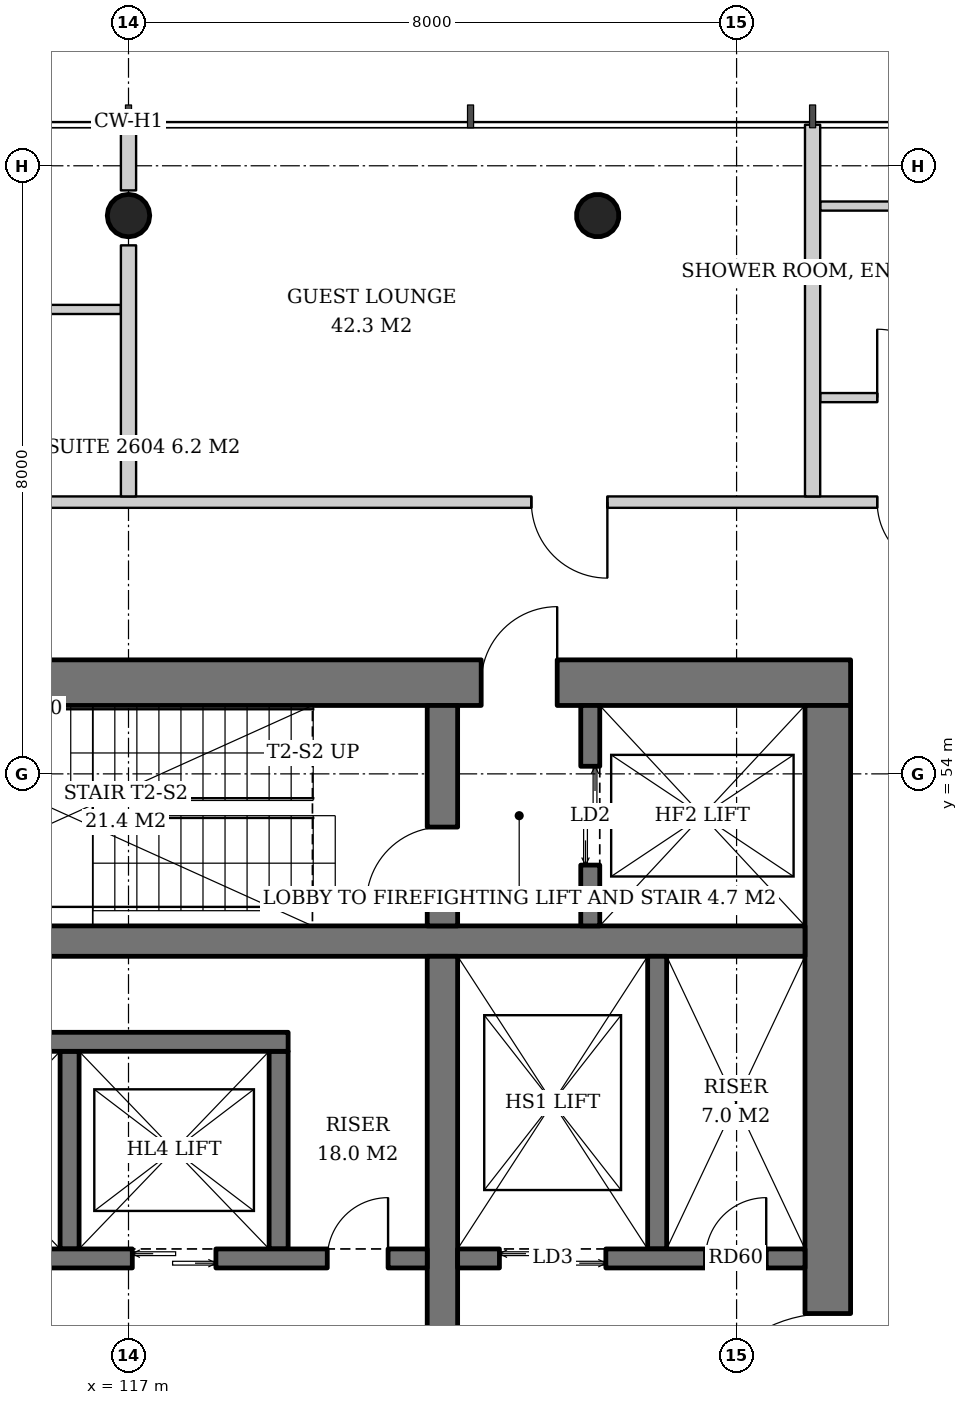
"""IFC4 building model, lengths in metres.
Left out: names, types, materials, properties, quantities, classifications, styles, units other than length and angle.
Written with IfcOpenShell. Run it as: python <this file> out.ifc"""

import sys

from ifc_helpers import new_model, si_unit, direction, frame, frame_2d, origin, origin_2d, place, context, subcontext, project, spatial, rectangle, hollow_circle, extrude, element, fill, save


model = new_model("IFC4")
c1 = context("Model", 3, precision=1e-05, world=origin(), true_north=direction((0.0, 1.0)))
c2 = subcontext(c1, "Body", "Model", "MODEL_VIEW")
j1 = project(units=[si_unit("LENGTHUNIT", "METRE"), si_unit("PLANEANGLEUNIT", "RADIAN")], contexts=[c1])
p1 = place(None, origin())
s1 = spatial("IfcSite", under=j1, at=p1, CompositionType="ELEMENT")
p2 = place(p1, origin())
s2 = spatial("IfcBuilding", under=s1, at=p2, CompositionType="ELEMENT")
p3 = place(p2, frame((0.0, 0.0, 104.6)))
s3 = spatial("IfcBuildingStorey", under=s2, at=p3, CompositionType="ELEMENT", Elevation=104.6)
p4 = place(p3, frame((123.198, 61.396, 0.0), z_axis=(-0.02149908433, -0.04306234503, 0.998841040313), x_axis=(0.894693706707, -0.446680166538, 0.0)))
e1 = element("IfcColumn", 1, at=p4, inside=s3, PredefinedType="COLUMN", context=c2, shape_type="SweptSolid", body=[
    extrude(hollow_circle(Radius=0.28, WallThickness=0.02, at=origin_2d()), origin(), (0.0, 0.0, 1.0), 3.804),
])
p5 = place(p3, frame((117.0, 61.396, 0.0), z_axis=(0.0, -0.043072300418, 0.999071957837), x_axis=(1.0, 0.0, 0.0)))
e2 = element("IfcColumn", 2, at=p5, inside=s3, PredefinedType="COLUMN", context=c2, shape_type="SweptSolid", body=[
    extrude(hollow_circle(Radius=0.28, WallThickness=0.02, at=origin_2d()), origin(), (0.0, 0.0, 1.0), 3.803),
])
p6 = place(p3, frame((107.5, 55.2, 0.0), z_axis=(0.0, 0.0, 1.0), x_axis=(1.0, 0.0, 0.0)))
e3 = element("IfcWall", 3, at=p6, inside=s3, PredefinedType="SHEAR", context=c2, shape_type="SweptSolid", body=[
    extrude(rectangle(XDim=19.0, YDim=0.6, at=frame_2d((9.5, 0.0))), origin(), (0.0, 0.0, 1.0), 3.8),
])
p7 = place(p6, frame((14.14, 0.0, 0.0)))
e4 = element("IfcOpeningElement", 4, at=p7, cuts=e3, PredefinedType="OPENING", context=c2, shape_type="SweptSolid", body=[
    extrude(rectangle(XDim=1.0, YDim=2.1, at=frame_2d((0.5, 1.05))), frame((0.0, 0.31, 0.0), z_axis=(0.0, -1.0, 0.0), x_axis=(1.0, 0.0, 0.0)), (0.0, 0.0, 1.0), 0.62),
])
p8 = place(p6, frame((2.425, 0.0, 0.0)))
e5 = element("IfcOpeningElement", 5, at=p8, cuts=e3, PredefinedType="OPENING", context=c2, shape_type="SweptSolid", body=[
    extrude(rectangle(XDim=1.0, YDim=2.1, at=frame_2d((0.5, 1.05))), frame((0.0, 0.31, 0.0), z_axis=(0.0, -1.0, 0.0), x_axis=(1.0, 0.0, 0.0)), (0.0, 0.0, 1.0), 0.62),
])
p9 = place(p3, frame((126.2, 37.1, 0.0), z_axis=(0.0, 0.0, 1.0), x_axis=(0.0, 1.0, 0.0)))
e6 = element("IfcWall", 6, at=p9, inside=s3, PredefinedType="SHEAR", context=c2, shape_type="SweptSolid", body=[
    extrude(rectangle(XDim=17.8, YDim=0.6, at=frame_2d((8.9, 0.0))), origin(), (0.0, 0.0, 1.0), 3.8),
])
p10 = place(p9, frame((8.0, 0.0, 0.0)))
e7 = element("IfcOpeningElement", 7, at=p10, cuts=e6, PredefinedType="OPENING", context=c2, shape_type="SweptSolid", body=[
    extrude(rectangle(XDim=1.8, YDim=2.4, at=frame_2d((0.9, 1.2))), frame((0.0, 0.31, 0.0), z_axis=(0.0, -1.0, 0.0), x_axis=(1.0, 0.0, 0.0)), (0.0, 0.0, 1.0), 0.62),
])
p11 = place(p3, frame((108.1, 51.8, 0.0), z_axis=(0.0, 0.0, 1.0), x_axis=(1.0, 0.0, 0.0)))
e8 = element("IfcWall", 8, at=p11, inside=s3, PredefinedType="SHEAR", context=c2, shape_type="SweptSolid", body=[
    extrude(rectangle(XDim=17.8, YDim=0.4, at=frame_2d((8.9, 0.0))), origin(), (0.0, 0.0, 1.0), 3.8),
])
p12 = place(p3, frame((121.13, 40.4, 0.0), z_axis=(0.0, 0.0, 1.0), x_axis=(0.0, 1.0, 0.0)))
e9 = element("IfcWall", 9, at=p12, inside=s3, PredefinedType="SHEAR", context=c2, shape_type="SweptSolid", body=[
    extrude(rectangle(XDim=11.2, YDim=0.4, at=frame_2d((5.6, 0.0))), origin(), (0.0, 0.0, 1.0), 3.8),
])
p13 = place(p3, frame((121.13, 52.0, 0.0), z_axis=(0.0, 0.0, 1.0), x_axis=(0.0, 1.0, 0.0)))
e10 = element("IfcWall", 10, at=p13, inside=s3, PredefinedType="SHEAR", context=c2, shape_type="SweptSolid", body=[
    extrude(rectangle(XDim=2.9, YDim=0.4, at=frame_2d((1.45, 0.0))), origin(), (0.0, 0.0, 1.0), 3.8),
])
p14 = place(p13, frame((0.3, 0.0, 0.0)))
e11 = element("IfcOpeningElement", 11, at=p14, cuts=e10, PredefinedType="OPENING", context=c2, shape_type="SweptSolid", body=[
    extrude(rectangle(XDim=1.0, YDim=2.1, at=frame_2d((0.5, 1.05))), frame((0.0, 0.21, 0.0), z_axis=(0.0, -1.0, 0.0), x_axis=(1.0, 0.0, 0.0)), (0.0, 0.0, 1.0), 0.42),
])
p15 = place(p3, frame((123.075, 52.0, 0.0), z_axis=(0.0, 0.0, 1.0), x_axis=(0.0, 1.0, 0.0)))
e12 = element("IfcWall", 12, at=p15, inside=s3, PredefinedType="SHEAR", context=c2, shape_type="SweptSolid", body=[
    extrude(rectangle(XDim=2.9, YDim=0.25, at=frame_2d((1.45, 0.0))), origin(), (0.0, 0.0, 1.0), 3.8),
])
p16 = place(p15, frame((0.8, 0.0, 0.0)))
e13 = element("IfcOpeningElement", 13, at=p16, cuts=e12, PredefinedType="OPENING", context=c2, shape_type="SweptSolid", body=[
    extrude(rectangle(XDim=1.3, YDim=2.2, at=frame_2d((0.65, 1.1))), frame((0.0, 0.135, 0.0), z_axis=(0.0, -1.0, 0.0), x_axis=(1.0, 0.0, 0.0)), (0.0, 0.0, 1.0), 0.27),
])
for number, where, z_axis, x_axis in (
    (14, (116.225, 47.75, 0.0), (0.0, 0.0, 1.0), (0.0, 1.0, 0.0)),
    (15, (118.975, 47.75, 0.0), (0.0, 0.0, 1.0), (0.0, 1.0, 0.0)),
):
    element("IfcWall", number, at=place(p3, frame(where, z_axis=z_axis, x_axis=x_axis)), inside=s3, PredefinedType="SHEAR", context=c2, shape_type="SweptSolid", body=[
        extrude(rectangle(XDim=2.6, YDim=0.25, at=frame_2d((1.3, 0.0))), origin(), (0.0, 0.0, 1.0), 3.8),
    ])
p17 = place(p3, frame((108.1, 50.475, 0.0), z_axis=(0.0, 0.0, 1.0), x_axis=(1.0, 0.0, 0.0)))
e16 = element("IfcWall", 16, at=p17, inside=s3, PredefinedType="SHEAR", context=c2, shape_type="SweptSolid", body=[
    extrude(rectangle(XDim=11.0, YDim=0.25, at=frame_2d((5.5, 0.0))), origin(), (0.0, 0.0, 1.0), 3.8),
])
p18 = place(p3, frame((108.1, 47.625, 0.0), z_axis=(0.0, 0.0, 1.0), x_axis=(1.0, 0.0, 0.0)))
e17 = element("IfcWall", 17, at=p18, inside=s3, PredefinedType="SHEAR", context=c2, shape_type="SweptSolid", body=[
    extrude(rectangle(XDim=12.83, YDim=0.25, at=frame_2d((6.415, 0.0))), origin(), (0.0, 0.0, 1.0), 3.8),
])
p19 = place(p18, frame((0.7, 0.0, 0.0)))
e18 = element("IfcOpeningElement", 18, at=p19, cuts=e17, PredefinedType="OPENING", context=c2, shape_type="SweptSolid", body=[
    extrude(rectangle(XDim=1.1, YDim=2.2, at=frame_2d((0.55, 1.1))), frame((0.0, 0.135, 0.0), z_axis=(0.0, -1.0, 0.0), x_axis=(1.0, 0.0, 0.0)), (0.0, 0.0, 1.0), 0.27),
])
p20 = place(p18, frame((3.45, 0.0, 0.0)))
e19 = element("IfcOpeningElement", 19, at=p20, cuts=e17, PredefinedType="OPENING", context=c2, shape_type="SweptSolid", body=[
    extrude(rectangle(XDim=1.1, YDim=2.2, at=frame_2d((0.55, 1.1))), frame((0.0, 0.135, 0.0), z_axis=(0.0, -1.0, 0.0), x_axis=(1.0, 0.0, 0.0)), (0.0, 0.0, 1.0), 0.27),
])
p21 = place(p18, frame((6.2, 0.0, 0.0)))
e20 = element("IfcOpeningElement", 20, at=p21, cuts=e17, PredefinedType="OPENING", context=c2, shape_type="SweptSolid", body=[
    extrude(rectangle(XDim=1.1, YDim=2.2, at=frame_2d((0.55, 1.1))), frame((0.0, 0.135, 0.0), z_axis=(0.0, -1.0, 0.0), x_axis=(1.0, 0.0, 0.0)), (0.0, 0.0, 1.0), 0.27),
])
p22 = place(p18, frame((8.95, 0.0, 0.0)))
e21 = element("IfcOpeningElement", 21, at=p22, cuts=e17, PredefinedType="OPENING", context=c2, shape_type="SweptSolid", body=[
    extrude(rectangle(XDim=1.1, YDim=2.2, at=frame_2d((0.55, 1.1))), frame((0.0, 0.135, 0.0), z_axis=(0.0, -1.0, 0.0), x_axis=(1.0, 0.0, 0.0)), (0.0, 0.0, 1.0), 0.27),
])
p23 = place(p18, frame((11.515, 0.0, 0.0)))
e22 = element("IfcOpeningElement", 22, at=p23, cuts=e17, PredefinedType="OPENING", context=c2, shape_type="SweptSolid", body=[
    extrude(rectangle(XDim=0.8, YDim=2.0, at=frame_2d((0.4, 1.0))), frame((0.0, 0.135, 0.0), z_axis=(0.0, -1.0, 0.0), x_axis=(1.0, 0.0, 0.0)), (0.0, 0.0, 1.0), 0.27),
])
p24 = place(p3, frame((123.955, 47.75, 0.0), z_axis=(0.0, 0.0, 1.0), x_axis=(0.0, 1.0, 0.0)))
e23 = element("IfcWall", 23, at=p24, inside=s3, PredefinedType="SHEAR", context=c2, shape_type="SweptSolid", body=[
    extrude(rectangle(XDim=3.85, YDim=0.25, at=frame_2d((1.925, 0.0))), origin(), (0.0, 0.0, 1.0), 3.8),
])
p25 = place(p3, frame((121.33, 47.625, 0.0), z_axis=(0.0, 0.0, 1.0), x_axis=(1.0, 0.0, 0.0)))
e24 = element("IfcWall", 24, at=p25, inside=s3, PredefinedType="SHEAR", context=c2, shape_type="SweptSolid", body=[
    extrude(rectangle(XDim=4.57, YDim=0.25, at=frame_2d((2.285, 0.0))), origin(), (0.0, 0.0, 1.0), 3.8),
])
p26 = place(p25, frame((0.55, 0.0, 0.0)))
e25 = element("IfcOpeningElement", 25, at=p26, cuts=e24, PredefinedType="OPENING", context=c2, shape_type="SweptSolid", body=[
    extrude(rectangle(XDim=1.4, YDim=2.4, at=frame_2d((0.7, 1.2))), frame((0.0, 0.135, 0.0), z_axis=(0.0, -1.0, 0.0), x_axis=(1.0, 0.0, 0.0)), (0.0, 0.0, 1.0), 0.27),
])
p27 = place(p25, frame((3.26, 0.0, 0.0)))
e26 = element("IfcOpeningElement", 26, at=p27, cuts=e24, PredefinedType="OPENING", context=c2, shape_type="SweptSolid", body=[
    extrude(rectangle(XDim=0.8, YDim=2.0, at=frame_2d((0.4, 1.0))), frame((0.0, 0.135, 0.0), z_axis=(0.0, -1.0, 0.0), x_axis=(1.0, 0.0, 0.0)), (0.0, 0.0, 1.0), 0.27),
])
p28 = place(p3, frame((126.1, 58.95, 0.0), z_axis=(0.0, 0.0, 1.0), x_axis=(1.0, 0.0, 0.0)))
e27 = element("IfcWall", 27, at=p28, inside=s3, PredefinedType="PARTITIONING", context=c2, shape_type="SweptSolid", body=[
    extrude(rectangle(XDim=2.58, YDim=0.12, at=frame_2d((1.29, 0.0))), origin(), (0.0, 0.0, 1.0), 2.9),
])
p29 = place(p28, frame((0.75, 0.0, 0.0)))
e28 = element("IfcOpeningElement", 28, at=p29, cuts=e27, PredefinedType="OPENING", context=c2, shape_type="SweptSolid", body=[
    extrude(rectangle(XDim=0.9, YDim=2.1, at=frame_2d((0.45, 1.05))), frame((0.0, 0.07, 0.0), z_axis=(0.0, -1.0, 0.0), x_axis=(1.0, 0.0, 0.0)), (0.0, 0.0, 1.0), 0.14),
])
p30 = place(p3, frame((126.1, 61.47, 0.0), z_axis=(0.0, 0.0, 1.0), x_axis=(1.0, 0.0, 0.0)))
e29 = element("IfcWall", 29, at=p30, inside=s3, PredefinedType="PARTITIONING", context=c2, shape_type="SweptSolid", body=[
    extrude(rectangle(XDim=2.81, YDim=0.12, at=frame_2d((1.405, 0.0))), origin(), (0.0, 0.0, 1.0), 3.6),
])
p31 = place(p3, frame((116.9, 60.11, 0.0), z_axis=(0.0, 0.0, 1.0), x_axis=(-1.0, 0.0, 0.0)))
e30 = element("IfcWall", 30, at=p31, inside=s3, PredefinedType="PARTITIONING", context=c2, shape_type="SweptSolid", body=[
    extrude(rectangle(XDim=2.42, YDim=0.12, at=frame_2d((1.21, 0.0))), origin(), (0.0, 0.0, 1.0), 3.6),
])
p32 = place(p3, frame((128.108, 57.575, 0.0), z_axis=(0.0, 0.0, 1.0), x_axis=(-1.0, 0.0, 0.0)))
e31 = element("IfcWall", 31, at=p32, inside=s3, PredefinedType="PARTITIONING", context=c2, shape_type="SweptSolid", body=[
    extrude(rectangle(XDim=22.217, YDim=0.15, at=frame_2d((11.108, 0.0))), origin(), (0.0, 0.0, 1.0), 2.9),
])
p33 = place(p32, frame((0.358, 0.0, 0.0)))
e32 = element("IfcOpeningElement", 32, at=p33, cuts=e31, PredefinedType="OPENING", context=c2, shape_type="SweptSolid", body=[
    extrude(rectangle(XDim=0.9, YDim=2.1, at=frame_2d((0.45, 1.05))), frame((0.0, 0.085, 0.0), z_axis=(0.0, -1.0, 0.0), x_axis=(1.0, 0.0, 0.0)), (0.0, 0.0, 1.0), 0.17),
])
p34 = place(p32, frame((4.808, 0.0, 0.0)))
e33 = element("IfcOpeningElement", 33, at=p34, cuts=e31, PredefinedType="OPENING", context=c2, shape_type="SweptSolid", body=[
    extrude(rectangle(XDim=1.0, YDim=2.1, at=frame_2d((0.5, 1.05))), frame((0.0, 0.085, 0.0), z_axis=(0.0, -1.0, 0.0), x_axis=(1.0, 0.0, 0.0)), (0.0, 0.0, 1.0), 0.17),
])
p35 = place(p32, frame((13.858, 0.0, 0.0)))
e34 = element("IfcOpeningElement", 34, at=p35, cuts=e31, PredefinedType="OPENING", context=c2, shape_type="SweptSolid", body=[
    extrude(rectangle(XDim=0.9, YDim=2.1, at=frame_2d((0.45, 1.05))), frame((0.0, 0.085, 0.0), z_axis=(0.0, -1.0, 0.0), x_axis=(1.0, 0.0, 0.0)), (0.0, 0.0, 1.0), 0.17),
])
p36 = place(p3, frame((126.0, 57.65, 0.0), z_axis=(0.0, 0.0, 1.0), x_axis=(0.0, 1.0, 0.0)))
e35 = element("IfcWall", 35, at=p36, inside=s3, PredefinedType="PARTITIONING", context=c2, shape_type="SweptSolid", body=[
    extrude(rectangle(XDim=4.89, YDim=0.2, at=frame_2d((2.445, 0.0))), origin(), (0.0, 0.0, 1.0), 2.9),
])
p37 = place(p3, frame((117.0, 57.65, 0.0), z_axis=(0.0, 0.0, 1.0), x_axis=(0.0, 1.0, 0.0)))
e36 = element("IfcWall", 36, at=p37, inside=s3, PredefinedType="PARTITIONING", context=c2, shape_type="SweptSolid", body=[
    extrude(rectangle(XDim=3.303, YDim=0.2, at=frame_2d((1.652, 0.0))), origin(), (0.0, 0.0, 1.0), 3.6),
])
p38 = place(p3, frame((117.0, 61.676, 0.0), z_axis=(0.0, 0.0, 1.0), x_axis=(0.0, 1.0, 0.0)))
e37 = element("IfcWall", 37, at=p38, inside=s3, PredefinedType="PARTITIONING", context=c2, shape_type="SweptSolid", body=[
    extrude(rectangle(XDim=0.864, YDim=0.2, at=frame_2d((0.432, 0.0))), origin(), (0.0, 0.0, 1.0), 3.6),
])
p39 = place(p16, origin())
e38 = element("IfcDoor", 38, at=p39, inside=s3, OperationType="DOUBLE_DOOR_SLIDING", PredefinedType="DOOR", context=c2, shape_type="SweptSolid", body=[
    extrude(rectangle(XDim=1.3, YDim=2.2, at=frame_2d((0.65, 1.1))), frame((0.0, 0.025, 0.0), z_axis=(0.0, -1.0, 0.0), x_axis=(1.0, 0.0, 0.0)), (0.0, 0.0, 1.0), 0.05),
])
fill(e13, e38)
p40 = place(p22, origin())
e39 = element("IfcDoor", 39, at=p40, inside=s3, OperationType="DOUBLE_DOOR_SLIDING", PredefinedType="DOOR", context=c2, shape_type="SweptSolid", body=[
    extrude(rectangle(XDim=1.1, YDim=2.2, at=frame_2d((0.55, 1.1))), frame((0.0, 0.025, 0.0), z_axis=(0.0, -1.0, 0.0), x_axis=(1.0, 0.0, 0.0)), (0.0, 0.0, 1.0), 0.05),
])
fill(e21, e39)
p41 = place(p23, origin())
e40 = element("IfcDoor", 40, at=p41, inside=s3, OperationType="SINGLE_SWING_RIGHT", PredefinedType="DOOR", context=c2, shape_type="SweptSolid", body=[
    extrude(rectangle(XDim=0.8, YDim=2.0, at=frame_2d((0.4, 1.0))), frame((0.0, 0.025, 0.0), z_axis=(0.0, -1.0, 0.0), x_axis=(1.0, 0.0, 0.0)), (0.0, 0.0, 1.0), 0.05),
])
fill(e22, e40)
p42 = place(p26, origin())
e41 = element("IfcDoor", 41, at=p42, inside=s3, OperationType="DOUBLE_DOOR_SLIDING", PredefinedType="DOOR", context=c2, shape_type="SweptSolid", body=[
    extrude(rectangle(XDim=1.4, YDim=2.4, at=frame_2d((0.7, 1.2))), frame((0.0, 0.025, 0.0), z_axis=(0.0, -1.0, 0.0), x_axis=(1.0, 0.0, 0.0)), (0.0, 0.0, 1.0), 0.05),
])
fill(e25, e41)
p43 = place(p27, origin())
e42 = element("IfcDoor", 42, at=p43, inside=s3, OperationType="SINGLE_SWING_RIGHT", PredefinedType="DOOR", context=c2, shape_type="SweptSolid", body=[
    extrude(rectangle(XDim=0.8, YDim=2.0, at=frame_2d((0.4, 1.0))), frame((0.0, 0.025, 0.0), z_axis=(0.0, -1.0, 0.0), x_axis=(1.0, 0.0, 0.0)), (0.0, 0.0, 1.0), 0.05),
])
fill(e26, e42)
p44 = place(p14, origin())
e43 = element("IfcDoor", 43, at=p44, inside=s3, OperationType="SINGLE_SWING_LEFT", PredefinedType="DOOR", context=c2, shape_type="SweptSolid", body=[
    extrude(rectangle(XDim=1.0, YDim=2.1, at=frame_2d((0.5, 1.05))), frame((0.0, 0.025, 0.0), z_axis=(0.0, -1.0, 0.0), x_axis=(1.0, 0.0, 0.0)), (0.0, 0.0, 1.0), 0.05),
])
fill(e11, e43)
p45 = place(p7, origin())
e44 = element("IfcDoor", 44, at=p45, inside=s3, OperationType="SINGLE_SWING_RIGHT", PredefinedType="DOOR", context=c2, shape_type="SweptSolid", body=[
    extrude(rectangle(XDim=1.0, YDim=2.1, at=frame_2d((0.5, 1.05))), frame((0.0, 0.025, 0.0), z_axis=(0.0, -1.0, 0.0), x_axis=(1.0, 0.0, 0.0)), (0.0, 0.0, 1.0), 0.05),
])
fill(e4, e44)
p46 = place(p10, origin())
e45 = element("IfcDoor", 45, at=p46, inside=s3, OperationType="DOUBLE_DOOR_SINGLE_SWING", PredefinedType="DOOR", context=c2, shape_type="SweptSolid", body=[
    extrude(rectangle(XDim=1.8, YDim=2.4, at=frame_2d((0.9, 1.2))), frame((0.0, 0.025, 0.0), z_axis=(0.0, -1.0, 0.0), x_axis=(1.0, 0.0, 0.0)), (0.0, 0.0, 1.0), 0.05),
])
fill(e7, e45)
p47 = place(p29, origin())
e46 = element("IfcDoor", 46, at=p47, inside=s3, OperationType="SINGLE_SWING_LEFT", PredefinedType="DOOR", context=c2, shape_type="SweptSolid", body=[
    extrude(rectangle(XDim=0.9, YDim=2.1, at=frame_2d((0.45, 1.05))), frame((0.0, 0.025, 0.0), z_axis=(0.0, -1.0, 0.0), x_axis=(1.0, 0.0, 0.0)), (0.0, 0.0, 1.0), 0.05),
])
fill(e28, e46)
p48 = place(p33, origin())
e47 = element("IfcDoor", 47, at=p48, inside=s3, OperationType="SINGLE_SWING_LEFT", PredefinedType="DOOR", context=c2, shape_type="SweptSolid", body=[
    extrude(rectangle(XDim=0.9, YDim=2.1, at=frame_2d((0.45, 1.05))), frame((0.0, 0.025, 0.0), z_axis=(0.0, -1.0, 0.0), x_axis=(1.0, 0.0, 0.0)), (0.0, 0.0, 1.0), 0.05),
])
fill(e32, e47)
p49 = place(p34, origin())
e48 = element("IfcDoor", 48, at=p49, inside=s3, OperationType="SINGLE_SWING_LEFT", PredefinedType="DOOR", context=c2, shape_type="SweptSolid", body=[
    extrude(rectangle(XDim=1.0, YDim=2.1, at=frame_2d((0.5, 1.05))), frame((0.0, 0.025, 0.0), z_axis=(0.0, -1.0, 0.0), x_axis=(1.0, 0.0, 0.0)), (0.0, 0.0, 1.0), 0.05),
])
fill(e33, e48)
save(model, sys.argv[1])
